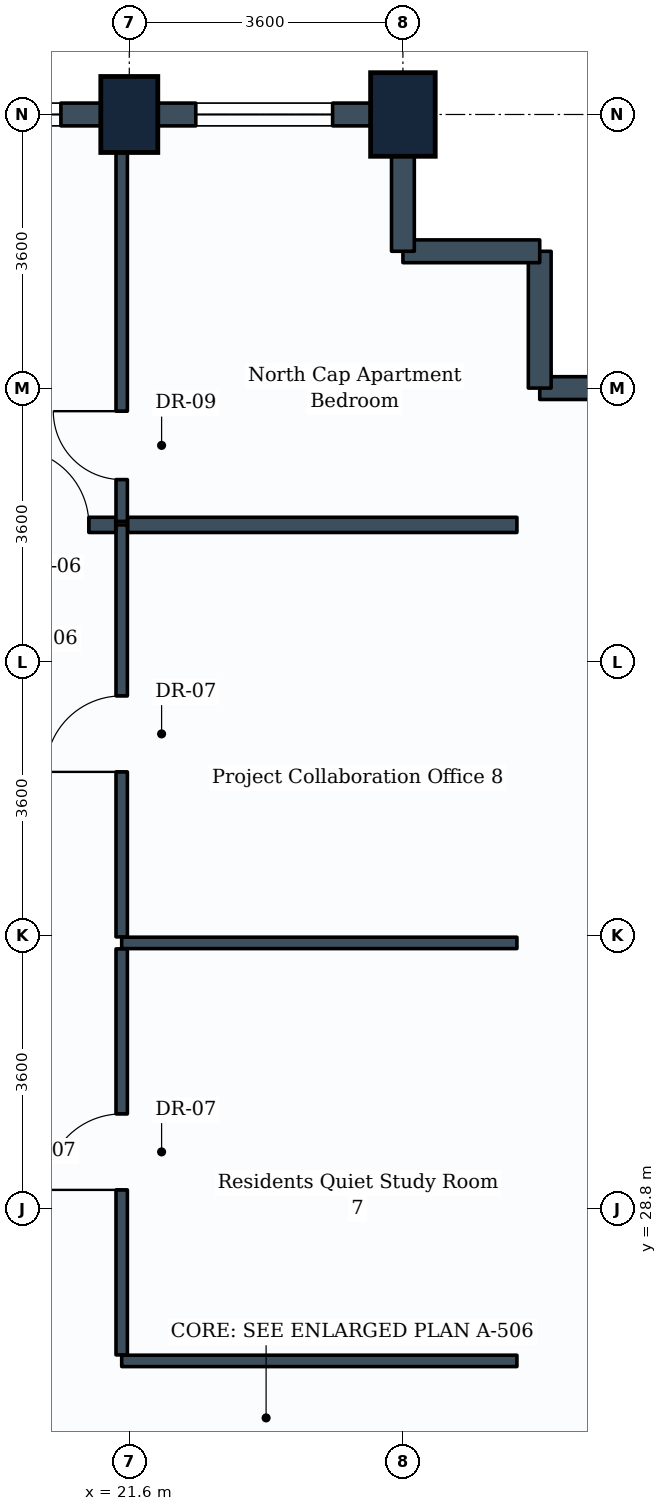
"""IFC4 building model, lengths in metres.
Left out: names, types, materials, properties, quantities, classifications, styles, units other than length and angle.
Written with IfcOpenShell. Run it as: python <this file> out.ifc"""

import sys

from ifc_helpers import new_model, si_unit, direction, frame, frame_2d, origin, origin_2d, place, context, subcontext, project, spatial, rectangle, extrude, element, fill, save


model = new_model("IFC4")
c1 = context("Model", 3, precision=1e-05, world=origin(), true_north=direction((0.0, 1.0)))
c2 = subcontext(c1, "Body", "Model", "MODEL_VIEW")
j1 = project(units=[si_unit("LENGTHUNIT", "METRE"), si_unit("PLANEANGLEUNIT", "RADIAN")], contexts=[c1])
p1 = place(None, origin())
s1 = spatial("IfcSite", under=j1, at=p1, CompositionType="ELEMENT")
p2 = place(p1, origin())
s2 = spatial("IfcBuilding", under=s1, at=p2, CompositionType="ELEMENT")
p3 = place(p2, frame((0.0, 0.0, 142.8)))
s3 = spatial("IfcBuildingStorey", under=s2, at=p3, CompositionType="ELEMENT", Elevation=142.8)
p4 = place(p3, frame((21.6, 43.2, 0.0), z_axis=(0.0, 0.0, 1.0), x_axis=(1.0, 0.0, 0.0)))
e1 = element("IfcColumn", 1, at=p4, inside=s3, PredefinedType="COLUMN", context=c2, shape_type="SweptSolid", body=[
    extrude(rectangle(XDim=0.75, YDim=1.0, at=origin_2d()), origin(), (0.0, 0.0, 1.0), 3.8),
])
p5 = place(p3, frame((25.2, 43.2, 0.0), z_axis=(0.0, 0.0, 1.0), x_axis=(1.0, 0.0, 0.0)))
e2 = element("IfcColumn", 2, at=p5, inside=s3, PredefinedType="COLUMN", context=c2, shape_type="SweptSolid", body=[
    extrude(rectangle(XDim=0.85, YDim=1.1, at=origin_2d()), origin(), (0.0, 0.0, 1.0), 3.8),
])
p6 = place(p3, frame((27.0, 39.6, 0.0), z_axis=(0.0, 0.0, 1.0), x_axis=(1.0, 0.0, 0.0)))
e3 = element("IfcWall", 3, at=p6, inside=s3, PredefinedType="STANDARD", context=c2, shape_type="SweptSolid", body=[
    extrude(rectangle(XDim=1.8, YDim=0.3, at=frame_2d((0.9, 0.0))), origin(), (0.0, 0.0, 1.0), 2.93),
])
p7 = place(p3, frame((27.0, 39.6, 0.0), z_axis=(0.0, 0.0, 1.0), x_axis=(0.0, 1.0, 0.0)))
e4 = element("IfcWall", 4, at=p7, inside=s3, PredefinedType="STANDARD", context=c2, shape_type="SweptSolid", body=[
    extrude(rectangle(XDim=1.8, YDim=0.3, at=frame_2d((0.9, 0.0))), origin(), (0.0, 0.0, 1.0), 3.535),
])
p8 = place(p3, frame((25.2, 41.4, 0.0), z_axis=(0.0, 0.0, 1.0), x_axis=(1.0, 0.0, 0.0)))
e5 = element("IfcWall", 5, at=p8, inside=s3, PredefinedType="STANDARD", context=c2, shape_type="SweptSolid", body=[
    extrude(rectangle(XDim=1.8, YDim=0.3, at=frame_2d((0.9, 0.0))), origin(), (0.0, 0.0, 1.0), 3.535),
])
p9 = place(p3, frame((25.2, 41.4, 0.0), z_axis=(0.0, 0.0, 1.0), x_axis=(0.0, 1.0, 0.0)))
e6 = element("IfcWall", 6, at=p9, inside=s3, PredefinedType="STANDARD", context=c2, shape_type="SweptSolid", body=[
    extrude(rectangle(XDim=1.8, YDim=0.3, at=frame_2d((0.9, 0.0))), origin(), (0.0, 0.0, 1.0), 2.93),
])
p10 = place(p3, frame((21.6, 43.2, 0.0), z_axis=(0.0, 0.0, 1.0), x_axis=(1.0, 0.0, 0.0)))
e7 = element("IfcWall", 7, at=p10, inside=s3, PredefinedType="STANDARD", context=c2, shape_type="SweptSolid", body=[
    extrude(rectangle(XDim=3.6, YDim=0.3, at=frame_2d((1.8, 0.0))), origin(), (0.0, 0.0, 1.0), 2.93),
])
p11 = place(p10, frame((0.875, 0.0, 0.85)))
e8 = element("IfcOpeningElement", 8, at=p11, cuts=e7, PredefinedType="OPENING", context=c2, shape_type="SweptSolid", body=[
    extrude(rectangle(XDim=1.8, YDim=1.35, at=frame_2d((0.9, 0.675))), frame((0.0, 0.16, 0.0), z_axis=(0.0, -1.0, 0.0), x_axis=(1.0, 0.0, 0.0)), (0.0, 0.0, 1.0), 0.32),
])
p12 = place(p3, frame((18.0, 43.2, 0.0), z_axis=(0.0, 0.0, 1.0), x_axis=(1.0, 0.0, 0.0)))
e9 = element("IfcWall", 9, at=p12, inside=s3, PredefinedType="STANDARD", context=c2, shape_type="SweptSolid", body=[
    extrude(rectangle(XDim=3.6, YDim=0.3, at=frame_2d((1.8, 0.0))), origin(), (0.0, 0.0, 1.0), 2.93),
])
p13 = place(p12, frame((0.9, 0.0, 0.85)))
e10 = element("IfcOpeningElement", 10, at=p13, cuts=e9, PredefinedType="OPENING", context=c2, shape_type="SweptSolid", body=[
    extrude(rectangle(XDim=1.8, YDim=1.35, at=frame_2d((0.9, 0.675))), frame((0.0, 0.16, 0.0), z_axis=(0.0, -1.0, 0.0), x_axis=(1.0, 0.0, 0.0)), (0.0, 0.0, 1.0), 0.32),
])
p14 = place(p3, frame((21.5, 26.8, 0.0), z_axis=(0.0, 0.0, 1.0), x_axis=(1.0, 0.0, 0.0)))
e11 = element("IfcWall", 11, at=p14, inside=s3, PredefinedType="PARTITIONING", context=c2, shape_type="SweptSolid", body=[
    extrude(rectangle(XDim=5.2, YDim=0.15, at=frame_2d((2.6, 0.0))), origin(), (0.0, 0.0, 1.0), 3.535),
])
p15 = place(p3, frame((21.5, 32.3, 0.0), z_axis=(0.0, 0.0, 1.0), x_axis=(1.0, 0.0, 0.0)))
e12 = element("IfcWall", 12, at=p15, inside=s3, PredefinedType="PARTITIONING", context=c2, shape_type="SweptSolid", body=[
    extrude(rectangle(XDim=5.2, YDim=0.15, at=frame_2d((2.6, 0.0))), origin(), (0.0, 0.0, 1.0), 3.18),
])
p16 = place(p3, frame((21.5, 26.879, 0.0), z_axis=(0.0, 0.0, 1.0), x_axis=(0.0, 1.0, 0.0)))
e13 = element("IfcWall", 13, at=p16, inside=s3, PredefinedType="PARTITIONING", context=c2, shape_type="SweptSolid", body=[
    extrude(rectangle(XDim=5.342, YDim=0.15, at=frame_2d((2.671, 0.0))), origin(), (0.0, 0.0, 1.0), 3.13),
])
p17 = place(p16, frame((2.171, 0.0, 0.0)))
e14 = element("IfcOpeningElement", 14, at=p17, cuts=e13, PredefinedType="OPENING", context=c2, shape_type="SweptSolid", body=[
    extrude(rectangle(XDim=1.0, YDim=2.1, at=frame_2d((0.5, 1.05))), frame((0.0, 0.085, 0.0), z_axis=(0.0, -1.0, 0.0), x_axis=(1.0, 0.0, 0.0)), (0.0, 0.0, 1.0), 0.17),
])
p18 = place(p3, frame((21.5, 32.379, 0.0), z_axis=(0.0, 0.0, 1.0), x_axis=(0.0, 1.0, 0.0)))
e15 = element("IfcWall", 15, at=p18, inside=s3, PredefinedType="PARTITIONING", context=c2, shape_type="SweptSolid", body=[
    extrude(rectangle(XDim=5.421, YDim=0.15, at=frame_2d((2.71, 0.0))), origin(), (0.0, 0.0, 1.0), 3.17),
])
p19 = place(p18, frame((2.171, 0.0, 0.0)))
e16 = element("IfcOpeningElement", 16, at=p19, cuts=e15, PredefinedType="OPENING", context=c2, shape_type="SweptSolid", body=[
    extrude(rectangle(XDim=1.0, YDim=2.1, at=frame_2d((0.5, 1.05))), frame((0.0, 0.085, 0.0), z_axis=(0.0, -1.0, 0.0), x_axis=(1.0, 0.0, 0.0)), (0.0, 0.0, 1.0), 0.17),
])
p20 = place(p3, frame((21.579, 37.8, 0.0), z_axis=(0.0, 0.0, 1.0), x_axis=(1.0, 0.0, 0.0)))
e17 = element("IfcWall", 17, at=p20, inside=s3, PredefinedType="PARTITIONING", context=c2, shape_type="SweptSolid", body=[
    extrude(rectangle(XDim=5.121, YDim=0.2, at=frame_2d((2.561, 0.0))), origin(), (0.0, 0.0, 1.0), 3.535),
])
p21 = place(p3, frame((19.754, 37.8, 0.0), z_axis=(0.0, 0.0, 1.0), x_axis=(1.0, 0.0, 0.0)))
e18 = element("IfcWall", 18, at=p21, inside=s3, PredefinedType="PARTITIONING", context=c2, shape_type="SweptSolid", body=[
    extrude(rectangle(XDim=1.667, YDim=0.2, at=frame_2d((0.833, 0.0))), origin(), (0.0, 0.0, 1.0), 3.535),
])
p22 = place(p21, frame((0.314, 0.0, 0.0)))
e19 = element("IfcOpeningElement", 19, at=p22, cuts=e18, PredefinedType="OPENING", context=c2, shape_type="SweptSolid", body=[
    extrude(rectangle(XDim=1.0, YDim=2.1, at=frame_2d((0.5, 1.05))), frame((0.0, 0.11, 0.0), z_axis=(0.0, -1.0, 0.0), x_axis=(1.0, 0.0, 0.0)), (0.0, 0.0, 1.0), 0.22),
])
p23 = place(p3, frame((21.5, 37.846, 0.0), z_axis=(0.0, 0.0, 1.0), x_axis=(0.0, 1.0, 0.0)))
e20 = element("IfcWall", 20, at=p23, inside=s3, PredefinedType="PARTITIONING", context=c2, shape_type="SweptSolid", body=[
    extrude(rectangle(XDim=5.2, YDim=0.15, at=frame_2d((2.6, 0.0))), origin(), (0.0, 0.0, 1.0), 2.93),
])
p24 = place(p23, frame((0.55, 0.0, 0.0)))
e21 = element("IfcOpeningElement", 21, at=p24, cuts=e20, PredefinedType="OPENING", context=c2, shape_type="SweptSolid", body=[
    extrude(rectangle(XDim=0.9, YDim=2.1, at=frame_2d((0.45, 1.05))), frame((0.0, 0.085, 0.0), z_axis=(0.0, -1.0, 0.0), x_axis=(1.0, 0.0, 0.0)), (0.0, 0.0, 1.0), 0.17),
])
p25 = place(p11, origin())
e22 = element("IfcWindow", 22, at=p25, inside=s3, PartitioningType="SINGLE_PANEL", PredefinedType="WINDOW", context=c2, shape_type="SweptSolid", body=[
    extrude(rectangle(XDim=1.8, YDim=1.35, at=frame_2d((0.9, 0.675))), frame((0.0, 0.03, 0.0), z_axis=(0.0, -1.0, 0.0), x_axis=(1.0, 0.0, 0.0)), (0.0, 0.0, 1.0), 0.06),
])
fill(e8, e22)
p26 = place(p13, origin())
e23 = element("IfcWindow", 23, at=p26, inside=s3, PartitioningType="SINGLE_PANEL", PredefinedType="WINDOW", context=c2, shape_type="SweptSolid", body=[
    extrude(rectangle(XDim=1.8, YDim=1.35, at=frame_2d((0.9, 0.675))), frame((0.0, 0.03, 0.0), z_axis=(0.0, -1.0, 0.0), x_axis=(1.0, 0.0, 0.0)), (0.0, 0.0, 1.0), 0.06),
])
fill(e10, e23)
p27 = place(p17, origin())
e24 = element("IfcDoor", 24, at=p27, inside=s3, OperationType="SINGLE_SWING_LEFT", PredefinedType="DOOR", context=c2, shape_type="SweptSolid", body=[
    extrude(rectangle(XDim=1.0, YDim=2.1, at=frame_2d((0.5, 1.05))), frame((0.0, 0.025, 0.0), z_axis=(0.0, -1.0, 0.0), x_axis=(1.0, 0.0, 0.0)), (0.0, 0.0, 1.0), 0.05),
])
fill(e14, e24)
p28 = place(p19, origin())
e25 = element("IfcDoor", 25, at=p28, inside=s3, OperationType="SINGLE_SWING_LEFT", PredefinedType="DOOR", context=c2, shape_type="SweptSolid", body=[
    extrude(rectangle(XDim=1.0, YDim=2.1, at=frame_2d((0.5, 1.05))), frame((0.0, 0.025, 0.0), z_axis=(0.0, -1.0, 0.0), x_axis=(1.0, 0.0, 0.0)), (0.0, 0.0, 1.0), 0.05),
])
fill(e16, e25)
p29 = place(p22, origin())
e26 = element("IfcDoor", 26, at=p29, inside=s3, OperationType="SINGLE_SWING_LEFT", PredefinedType="DOOR", context=c2, shape_type="SweptSolid", body=[
    extrude(rectangle(XDim=1.0, YDim=2.1, at=frame_2d((0.5, 1.05))), frame((0.0, 0.025, 0.0), z_axis=(0.0, -1.0, 0.0), x_axis=(1.0, 0.0, 0.0)), (0.0, 0.0, 1.0), 0.05),
])
fill(e19, e26)
p30 = place(p24, origin())
e27 = element("IfcDoor", 27, at=p30, inside=s3, OperationType="SINGLE_SWING_RIGHT", PredefinedType="DOOR", context=c2, shape_type="SweptSolid", body=[
    extrude(rectangle(XDim=0.9, YDim=2.1, at=frame_2d((0.45, 1.05))), frame((0.0, 0.025, 0.0), z_axis=(0.0, -1.0, 0.0), x_axis=(1.0, 0.0, 0.0)), (0.0, 0.0, 1.0), 0.05),
])
fill(e21, e27)
save(model, sys.argv[1])
